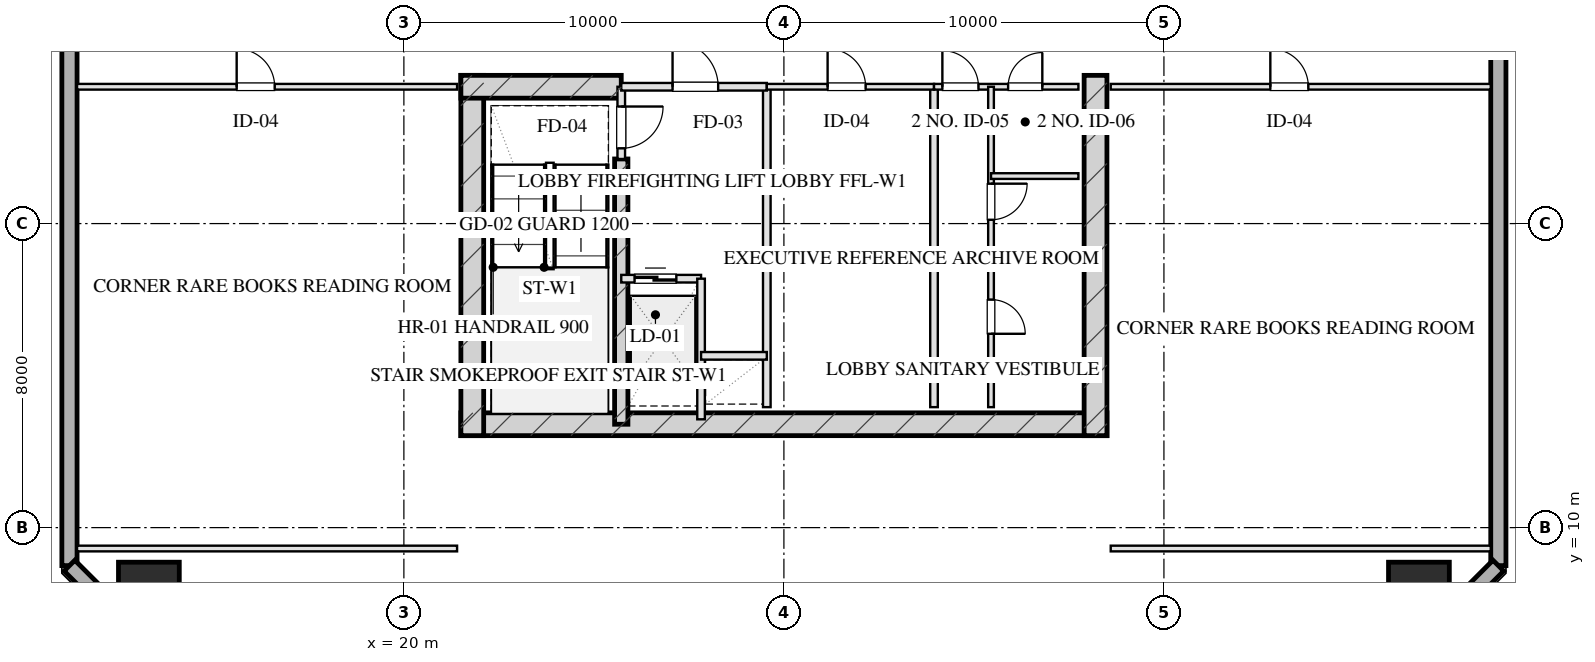
"""IFC4 building model, lengths in metres.
Left out: names, types, materials, properties, quantities, classifications, styles, units other than length and angle.
Written with IfcOpenShell. Run it as: python <this file> out.ifc"""

import sys

from ifc_helpers import new_model, si_unit, direction, frame, frame_2d, origin, origin_2d, place, context, subcontext, project, spatial, rectangle, hollow_rectangle, extrude, element, fill, save


model = new_model("IFC4")
c1 = context("Model", 3, precision=1e-05, world=origin(), true_north=direction((0.0, 1.0)))
c2 = subcontext(c1, "Body", "Model", "MODEL_VIEW")
j1 = project(units=[si_unit("LENGTHUNIT", "METRE"), si_unit("PLANEANGLEUNIT", "RADIAN")], contexts=[c1])
p1 = place(None, origin())
s1 = spatial("IfcSite", under=j1, at=p1, CompositionType="ELEMENT")
p2 = place(p1, origin())
s2 = spatial("IfcBuilding", under=s1, at=p2, CompositionType="ELEMENT")
p3 = place(p2, frame((0.0, 0.0, 100.05)))
s3 = spatial("IfcBuildingStorey", under=s2, at=p3, CompositionType="ELEMENT", Elevation=100.05)
p4 = place(p3, frame((21.5, 12.72, 0.0), z_axis=(0.0, 0.0, 1.0), x_axis=(1.0, 0.0, 0.0)))
e1 = element("IfcWall", 1, at=p4, inside=s3, PredefinedType="SHEAR", context=c2, shape_type="SweptSolid", body=[
    extrude(rectangle(XDim=17.0, YDim=0.6, at=frame_2d((8.5, 0.0))), origin(), (0.0, 0.0, 1.0), 3.45),
])
for number, where, z_axis, x_axis in (
    (2, (21.8, 21.9, 0.0), (0.0, 0.0, 1.0), (0.0, -1.0, 0.0)),
    (3, (38.2, 21.9, 0.0), (0.0, 0.0, 1.0), (0.0, -1.0, 0.0)),
):
    element("IfcWall", number, at=place(p3, frame(where, z_axis=z_axis, x_axis=x_axis)), inside=s3, PredefinedType="SHEAR", context=c2, shape_type="SweptSolid", body=[
        extrude(rectangle(XDim=9.48, YDim=0.6, at=frame_2d((4.74, 0.0))), origin(), (0.0, 0.0, 1.0), 3.45),
    ])
p5 = place(p3, frame((25.72, 19.7, 0.0), z_axis=(0.0, 0.0, 1.0), x_axis=(0.0, -1.0, 0.0)))
e4 = element("IfcWall", 4, at=p5, inside=s3, PredefinedType="SHEAR", context=c2, shape_type="SweptSolid", body=[
    extrude(rectangle(XDim=6.98, YDim=0.35, at=frame_2d((3.49, 0.0))), origin(), (0.0, 0.0, 1.0), 3.45),
])
p6 = place(p3, frame((21.5, 21.6, 0.0), z_axis=(0.0, 0.0, 1.0), x_axis=(1.0, 0.0, 0.0)))
e5 = element("IfcWall", 5, at=p6, inside=s3, PredefinedType="SHEAR", context=c2, shape_type="SweptSolid", body=[
    extrude(rectangle(XDim=4.22, YDim=0.6, at=frame_2d((2.11, 0.0))), origin(), (0.0, 0.0, 1.0), 3.45),
])
for number, where, z_axis, x_axis in (
    (6, (13.29, 8.29, 0.0), (0.0, 0.0, 1.0), (1.0, 0.0, 0.0)),
    (7, (46.71, 8.29, 0.0), (0.0, 0.0, 1.0), (1.0, 0.0, 0.0)),
):
    element("IfcColumn", number, at=place(p3, frame(where, z_axis=z_axis, x_axis=x_axis)), inside=s3, PredefinedType="COLUMN", context=c2, shape_type="SweptSolid", body=[
        extrude(hollow_rectangle(XDim=1.6, YDim=1.6, WallThickness=0.055, at=origin_2d()), origin(), (0.0, 0.0, 1.0), 3.451),
    ])
p7 = place(p3, frame((11.2, 9.0, 0.0), z_axis=(0.0, 0.0, 1.0), x_axis=(0.0, 1.0, 0.0)))
e8 = element("IfcWall", 8, at=p7, inside=s3, PredefinedType="SOLIDWALL", context=c2, shape_type="SweptSolid", body=[
    extrude(rectangle(XDim=50.0, YDim=0.4, at=frame_2d((25.0, 0.0))), origin(), (0.0, 0.0, 1.0), 2.55),
])
p8 = place(p7, frame((21.2, 0.0, 0.75)))
e9 = element("IfcOpeningElement", 9, at=p8, cuts=e8, PredefinedType="OPENING", context=c2, shape_type="SweptSolid", body=[
    extrude(rectangle(XDim=2.4, YDim=1.4, at=frame_2d((1.2, 0.7))), frame((0.0, 0.21, 0.0), z_axis=(0.0, -1.0, 0.0), x_axis=(1.0, 0.0, 0.0)), (0.0, 0.0, 1.0), 0.42),
])
p9 = place(p7, frame((27.55, 0.0, 0.0)))
e10 = element("IfcOpeningElement", 10, at=p9, cuts=e8, PredefinedType="OPENING", context=c2, shape_type="SweptSolid", body=[
    extrude(rectangle(XDim=1.1, YDim=2.15, at=frame_2d((0.55, 1.075))), frame((0.0, 0.21, 0.0), z_axis=(0.0, -1.0, 0.0), x_axis=(1.0, 0.0, 0.0)), (0.0, 0.0, 1.0), 0.42),
])
p10 = place(p3, frame((48.8, 59.0, 0.0), z_axis=(0.0, 0.0, 1.0), x_axis=(0.0, -1.0, 0.0)))
e11 = element("IfcWall", 11, at=p10, inside=s3, PredefinedType="SOLIDWALL", context=c2, shape_type="SweptSolid", body=[
    extrude(rectangle(XDim=50.0, YDim=0.4, at=frame_2d((25.0, 0.0))), origin(), (0.0, 0.0, 1.0), 2.55),
])
p11 = place(p10, frame((18.65, 0.0, 0.0)))
e12 = element("IfcOpeningElement", 12, at=p11, cuts=e11, PredefinedType="OPENING", context=c2, shape_type="SweptSolid", body=[
    extrude(rectangle(XDim=1.1, YDim=2.15, at=frame_2d((0.55, 1.075))), frame((0.0, 0.21, 0.0), z_axis=(0.0, -1.0, 0.0), x_axis=(1.0, 0.0, 0.0)), (0.0, 0.0, 1.0), 0.42),
])
for number, where, z_axis, x_axis in (
    (13, (48.8, 9.0, 0.0), (0.0, 0.0, 1.0), (-0.707, -0.707, 0.0)),
    (14, (14.0, 6.2, 0.0), (0.0, 0.0, 1.0), (-0.707, 0.707, 0.0)),
):
    element("IfcWall", number, at=place(p3, frame(where, z_axis=z_axis, x_axis=x_axis)), inside=s3, PredefinedType="SOLIDWALL", context=c2, shape_type="SweptSolid", body=[
        extrude(rectangle(XDim=3.96, YDim=0.4, at=frame_2d((1.98, 0.0))), origin(), (0.0, 0.0, 1.0), 2.55),
    ])
p12 = place(p3, frame((25.72, 21.6, 0.0), z_axis=(0.0, 0.0, 1.0), x_axis=(0.0, -1.0, 0.0)))
e15 = element("IfcWall", 15, at=p12, inside=s3, PredefinedType="PARTITIONING", context=c2, shape_type="SweptSolid", body=[
    extrude(rectangle(XDim=1.9, YDim=0.2, at=frame_2d((0.95, 0.0))), origin(), (0.0, 0.0, 1.0), 3.155),
])
p13 = place(p12, frame((0.52, 0.0, 0.0)))
e16 = element("IfcOpeningElement", 16, at=p13, cuts=e15, PredefinedType="OPENING", context=c2, shape_type="SweptSolid", body=[
    extrude(rectangle(XDim=1.1, YDim=2.05, at=frame_2d((0.55, 1.025))), frame((0.0, 0.11, 0.0), z_axis=(0.0, -1.0, 0.0), x_axis=(1.0, 0.0, 0.0)), (0.0, 0.0, 1.0), 0.22),
])
p14 = place(p3, frame((29.55, 21.6, 0.0), z_axis=(0.0, 0.0, 1.0), x_axis=(0.0, -1.0, 0.0)))
e17 = element("IfcWall", 17, at=p14, inside=s3, PredefinedType="PARTITIONING", context=c2, shape_type="SweptSolid", body=[
    extrude(rectangle(XDim=8.43, YDim=0.2, at=frame_2d((4.215, 0.0))), origin(), (0.0, 0.0, 1.0), 3.155),
])
p15 = place(p3, frame((25.72, 21.6, 0.0), z_axis=(0.0, 0.0, 1.0), x_axis=(1.0, 0.0, 0.0)))
e18 = element("IfcWall", 18, at=p15, inside=s3, PredefinedType="PARTITIONING", context=c2, shape_type="SweptSolid", body=[
    extrude(rectangle(XDim=3.83, YDim=0.2, at=frame_2d((1.915, 0.0))), origin(), (0.0, 0.0, 1.0), 3.155),
])
p16 = place(p15, frame((1.35, 0.0, 0.0)))
e19 = element("IfcOpeningElement", 19, at=p16, cuts=e18, PredefinedType="OPENING", context=c2, shape_type="SweptSolid", body=[
    extrude(rectangle(XDim=1.2, YDim=2.05, at=frame_2d((0.6, 1.025))), frame((0.0, 0.11, 0.0), z_axis=(0.0, -1.0, 0.0), x_axis=(1.0, 0.0, 0.0)), (0.0, 0.0, 1.0), 0.22),
])
p17 = place(p3, frame((25.72, 16.55, 0.0), z_axis=(0.0, 0.0, 1.0), x_axis=(1.0, 0.0, 0.0)))
e20 = element("IfcWall", 20, at=p17, inside=s3, PredefinedType="PARTITIONING", context=c2, shape_type="SweptSolid", body=[
    extrude(rectangle(XDim=2.1, YDim=0.2, at=frame_2d((1.05, 0.0))), origin(), (0.0, 0.0, 1.0), 3.155),
])
p18 = place(p17, frame((0.35, 0.0, 0.0)))
e21 = element("IfcOpeningElement", 21, at=p18, cuts=e20, PredefinedType="OPENING", context=c2, shape_type="SweptSolid", body=[
    extrude(rectangle(XDim=1.1, YDim=2.05, at=frame_2d((0.55, 1.025))), frame((0.0, 0.11, 0.0), z_axis=(0.0, -1.0, 0.0), x_axis=(1.0, 0.0, 0.0)), (0.0, 0.0, 1.0), 0.22),
])
p19 = place(p3, frame((27.82, 16.55, 0.0), z_axis=(0.0, 0.0, 1.0), x_axis=(0.0, -1.0, 0.0)))
e22 = element("IfcWall", 22, at=p19, inside=s3, PredefinedType="PARTITIONING", context=c2, shape_type="SweptSolid", body=[
    extrude(rectangle(XDim=3.7, YDim=0.2, at=frame_2d((1.85, 0.0))), origin(), (0.0, 0.0, 1.0), 3.155),
])
p20 = place(p3, frame((27.82, 14.52, 0.0), z_axis=(0.0, 0.0, 1.0), x_axis=(1.0, 0.0, 0.0)))
e23 = element("IfcWall", 23, at=p20, inside=s3, PredefinedType="PARTITIONING", context=c2, shape_type="SweptSolid", body=[
    extrude(rectangle(XDim=1.73, YDim=0.2, at=frame_2d((0.865, 0.0))), origin(), (0.0, 0.0, 1.0), 3.155),
])
p21 = place(p3, frame((33.95, 21.6, 0.0), z_axis=(0.0, 0.0, 1.0), x_axis=(0.0, -1.0, 0.0)))
e24 = element("IfcWall", 24, at=p21, inside=s3, PredefinedType="PARTITIONING", context=c2, shape_type="SweptSolid", body=[
    extrude(rectangle(XDim=8.43, YDim=0.2, at=frame_2d((4.215, 0.0))), origin(), (0.0, 0.0, 1.0), 3.155),
])
p22 = place(p3, frame((29.55, 21.6, 0.0), z_axis=(0.0, 0.0, 1.0), x_axis=(1.0, 0.0, 0.0)))
e25 = element("IfcWall", 25, at=p22, inside=s3, PredefinedType="PARTITIONING", context=c2, shape_type="SweptSolid", body=[
    extrude(rectangle(XDim=4.4, YDim=0.15, at=frame_2d((2.2, 0.0))), origin(), (0.0, 0.0, 1.0), 3.155),
])
p23 = place(p22, frame((1.6, 0.0, 0.0)))
e26 = element("IfcOpeningElement", 26, at=p23, cuts=e25, PredefinedType="OPENING", context=c2, shape_type="SweptSolid", body=[
    extrude(rectangle(XDim=1.0, YDim=2.05, at=frame_2d((0.5, 1.025))), frame((0.0, 0.085, 0.0), z_axis=(0.0, -1.0, 0.0), x_axis=(1.0, 0.0, 0.0)), (0.0, 0.0, 1.0), 0.17),
])
p24 = place(p3, frame((33.95, 21.6, 0.0), z_axis=(0.0, 0.0, 1.0), x_axis=(1.0, 0.0, 0.0)))
e27 = element("IfcWall", 27, at=p24, inside=s3, PredefinedType="PARTITIONING", context=c2, shape_type="SweptSolid", body=[
    extrude(rectangle(XDim=3.8, YDim=0.15, at=frame_2d((1.9, 0.0))), origin(), (0.0, 0.0, 1.0), 3.155),
])
p25 = place(p24, frame((0.22, 0.0, 0.0)))
e28 = element("IfcOpeningElement", 28, at=p25, cuts=e27, PredefinedType="OPENING", context=c2, shape_type="SweptSolid", body=[
    extrude(rectangle(XDim=0.95, YDim=2.05, at=frame_2d((0.475, 1.025))), frame((0.0, 0.085, 0.0), z_axis=(0.0, -1.0, 0.0), x_axis=(1.0, 0.0, 0.0)), (0.0, 0.0, 1.0), 0.17),
])
p26 = place(p24, frame((1.95, 0.0, 0.0)))
e29 = element("IfcOpeningElement", 29, at=p26, cuts=e27, PredefinedType="OPENING", context=c2, shape_type="SweptSolid", body=[
    extrude(rectangle(XDim=0.9, YDim=2.05, at=frame_2d((0.45, 1.025))), frame((0.0, 0.085, 0.0), z_axis=(0.0, -1.0, 0.0), x_axis=(1.0, 0.0, 0.0)), (0.0, 0.0, 1.0), 0.17),
])
p27 = place(p3, frame((35.45, 21.6, 0.0), z_axis=(0.0, 0.0, 1.0), x_axis=(0.0, -1.0, 0.0)))
e30 = element("IfcWall", 30, at=p27, inside=s3, PredefinedType="PARTITIONING", context=c2, shape_type="SweptSolid", body=[
    extrude(rectangle(XDim=8.43, YDim=0.15, at=frame_2d((4.215, 0.0))), origin(), (0.0, 0.0, 1.0), 2.815),
])
p28 = place(p27, frame((2.55, 0.0, 0.0)))
e31 = element("IfcOpeningElement", 31, at=p28, cuts=e30, PredefinedType="OPENING", context=c2, shape_type="SweptSolid", body=[
    extrude(rectangle(XDim=0.95, YDim=2.05, at=frame_2d((0.475, 1.025))), frame((0.0, 0.085, 0.0), z_axis=(0.0, -1.0, 0.0), x_axis=(1.0, 0.0, 0.0)), (0.0, 0.0, 1.0), 0.17),
])
p29 = place(p27, frame((5.6, 0.0, 0.0)))
e32 = element("IfcOpeningElement", 32, at=p29, cuts=e30, PredefinedType="OPENING", context=c2, shape_type="SweptSolid", body=[
    extrude(rectangle(XDim=0.9, YDim=2.05, at=frame_2d((0.45, 1.025))), frame((0.0, 0.085, 0.0), z_axis=(0.0, -1.0, 0.0), x_axis=(1.0, 0.0, 0.0)), (0.0, 0.0, 1.0), 0.17),
])
for number, where, z_axis, x_axis in (
    (33, (35.45, 17.2, 0.0), (0.0, 0.0, 1.0), (1.0, 0.0, 0.0)),
    (34, (35.45, 19.25, 0.0), (0.0, 0.0, 1.0), (1.0, 0.0, 0.0)),
):
    element("IfcWall", number, at=place(p3, frame(where, z_axis=z_axis, x_axis=x_axis)), inside=s3, PredefinedType="PARTITIONING", context=c2, shape_type="SweptSolid", body=[
        extrude(rectangle(XDim=2.3, YDim=0.15, at=frame_2d((1.15, 0.0))), origin(), (0.0, 0.0, 1.0), 3.155),
    ])
p30 = place(p3, frame((11.4, 9.45, 0.0), z_axis=(0.0, 0.0, 1.0), x_axis=(1.0, 0.0, 0.0)))
e35 = element("IfcWall", 35, at=p30, inside=s3, PredefinedType="PARTITIONING", context=c2, shape_type="SweptSolid", body=[
    extrude(rectangle(XDim=10.0, YDim=0.15, at=frame_2d((5.0, 0.0))), origin(), (0.0, 0.0, 1.0), 3.155),
])
p31 = place(p3, frame((11.4, 21.6, 0.0), z_axis=(0.0, 0.0, 1.0), x_axis=(1.0, 0.0, 0.0)))
e36 = element("IfcWall", 36, at=p31, inside=s3, PredefinedType="PARTITIONING", context=c2, shape_type="SweptSolid", body=[
    extrude(rectangle(XDim=10.0, YDim=0.15, at=frame_2d((5.0, 0.0))), origin(), (0.0, 0.0, 1.0), 3.155),
])
p32 = place(p31, frame((4.2, 0.0, 0.0)))
e37 = element("IfcOpeningElement", 37, at=p32, cuts=e36, PredefinedType="OPENING", context=c2, shape_type="SweptSolid", body=[
    extrude(rectangle(XDim=1.0, YDim=2.05, at=frame_2d((0.5, 1.025))), frame((0.0, 0.085, 0.0), z_axis=(0.0, -1.0, 0.0), x_axis=(1.0, 0.0, 0.0)), (0.0, 0.0, 1.0), 0.17),
])
p33 = place(p3, frame((38.6, 9.45, 0.0), z_axis=(0.0, 0.0, 1.0), x_axis=(1.0, 0.0, 0.0)))
e38 = element("IfcWall", 38, at=p33, inside=s3, PredefinedType="PARTITIONING", context=c2, shape_type="SweptSolid", body=[
    extrude(rectangle(XDim=10.0, YDim=0.15, at=frame_2d((5.0, 0.0))), origin(), (0.0, 0.0, 1.0), 3.155),
])
p34 = place(p3, frame((38.6, 21.6, 0.0), z_axis=(0.0, 0.0, 1.0), x_axis=(1.0, 0.0, 0.0)))
e39 = element("IfcWall", 39, at=p34, inside=s3, PredefinedType="PARTITIONING", context=c2, shape_type="SweptSolid", body=[
    extrude(rectangle(XDim=10.0, YDim=0.15, at=frame_2d((5.0, 0.0))), origin(), (0.0, 0.0, 1.0), 3.155),
])
p35 = place(p34, frame((4.2, 0.0, 0.0)))
e40 = element("IfcOpeningElement", 40, at=p35, cuts=e39, PredefinedType="OPENING", context=c2, shape_type="SweptSolid", body=[
    extrude(rectangle(XDim=1.0, YDim=2.05, at=frame_2d((0.5, 1.025))), frame((0.0, 0.085, 0.0), z_axis=(0.0, -1.0, 0.0), x_axis=(1.0, 0.0, 0.0)), (0.0, 0.0, 1.0), 0.17),
])
p36 = place(p13, origin())
e41 = element("IfcDoor", 41, at=p36, inside=s3, OperationType="SINGLE_SWING_LEFT", PredefinedType="DOOR", context=c2, shape_type="SweptSolid", body=[
    extrude(rectangle(XDim=1.1, YDim=2.05, at=frame_2d((0.55, 1.025))), frame((0.0, 0.025, 0.0), z_axis=(0.0, -1.0, 0.0), x_axis=(1.0, 0.0, 0.0)), (0.0, 0.0, 1.0), 0.05),
])
fill(e16, e41)
p37 = place(p16, origin())
e42 = element("IfcDoor", 42, at=p37, inside=s3, OperationType="SINGLE_SWING_LEFT", PredefinedType="DOOR", context=c2, shape_type="SweptSolid", body=[
    extrude(rectangle(XDim=1.2, YDim=2.05, at=frame_2d((0.6, 1.025))), frame((0.0, 0.025, 0.0), z_axis=(0.0, -1.0, 0.0), x_axis=(1.0, 0.0, 0.0)), (0.0, 0.0, 1.0), 0.05),
])
fill(e19, e42)
p38 = place(p18, origin())
e43 = element("IfcDoor", 43, at=p38, inside=s3, OperationType="DOUBLE_DOOR_SLIDING", PredefinedType="DOOR", context=c2, shape_type="SweptSolid", body=[
    extrude(rectangle(XDim=1.1, YDim=2.05, at=frame_2d((0.55, 1.025))), frame((0.0, 0.025, 0.0), z_axis=(0.0, -1.0, 0.0), x_axis=(1.0, 0.0, 0.0)), (0.0, 0.0, 1.0), 0.05),
])
fill(e21, e43)
p39 = place(p23, origin())
e44 = element("IfcDoor", 44, at=p39, inside=s3, OperationType="SINGLE_SWING_LEFT", PredefinedType="DOOR", context=c2, shape_type="SweptSolid", body=[
    extrude(rectangle(XDim=1.0, YDim=2.05, at=frame_2d((0.5, 1.025))), frame((0.0, 0.025, 0.0), z_axis=(0.0, -1.0, 0.0), x_axis=(1.0, 0.0, 0.0)), (0.0, 0.0, 1.0), 0.05),
])
fill(e26, e44)
p40 = place(p25, origin())
e45 = element("IfcDoor", 45, at=p40, inside=s3, OperationType="SINGLE_SWING_LEFT", PredefinedType="DOOR", context=c2, shape_type="SweptSolid", body=[
    extrude(rectangle(XDim=0.95, YDim=2.05, at=frame_2d((0.475, 1.025))), frame((0.0, 0.025, 0.0), z_axis=(0.0, -1.0, 0.0), x_axis=(1.0, 0.0, 0.0)), (0.0, 0.0, 1.0), 0.05),
])
fill(e28, e45)
p41 = place(p26, origin())
e46 = element("IfcDoor", 46, at=p41, inside=s3, OperationType="SINGLE_SWING_RIGHT", PredefinedType="DOOR", context=c2, shape_type="SweptSolid", body=[
    extrude(rectangle(XDim=0.9, YDim=2.05, at=frame_2d((0.45, 1.025))), frame((0.0, 0.025, 0.0), z_axis=(0.0, -1.0, 0.0), x_axis=(1.0, 0.0, 0.0)), (0.0, 0.0, 1.0), 0.05),
])
fill(e29, e46)
p42 = place(p28, origin())
e47 = element("IfcDoor", 47, at=p42, inside=s3, OperationType="SINGLE_SWING_LEFT", PredefinedType="DOOR", context=c2, shape_type="SweptSolid", body=[
    extrude(rectangle(XDim=0.95, YDim=2.05, at=frame_2d((0.475, 1.025))), frame((0.0, 0.025, 0.0), z_axis=(0.0, -1.0, 0.0), x_axis=(1.0, 0.0, 0.0)), (0.0, 0.0, 1.0), 0.05),
])
fill(e31, e47)
p43 = place(p29, origin())
e48 = element("IfcDoor", 48, at=p43, inside=s3, OperationType="SINGLE_SWING_RIGHT", PredefinedType="DOOR", context=c2, shape_type="SweptSolid", body=[
    extrude(rectangle(XDim=0.9, YDim=2.05, at=frame_2d((0.45, 1.025))), frame((0.0, 0.025, 0.0), z_axis=(0.0, -1.0, 0.0), x_axis=(1.0, 0.0, 0.0)), (0.0, 0.0, 1.0), 0.05),
])
fill(e32, e48)
p44 = place(p32, origin())
e49 = element("IfcDoor", 49, at=p44, inside=s3, OperationType="SINGLE_SWING_LEFT", PredefinedType="DOOR", context=c2, shape_type="SweptSolid", body=[
    extrude(rectangle(XDim=1.0, YDim=2.05, at=frame_2d((0.5, 1.025))), frame((0.0, 0.025, 0.0), z_axis=(0.0, -1.0, 0.0), x_axis=(1.0, 0.0, 0.0)), (0.0, 0.0, 1.0), 0.05),
])
fill(e37, e49)
p45 = place(p35, origin())
e50 = element("IfcDoor", 50, at=p45, inside=s3, OperationType="SINGLE_SWING_LEFT", PredefinedType="DOOR", context=c2, shape_type="SweptSolid", body=[
    extrude(rectangle(XDim=1.0, YDim=2.05, at=frame_2d((0.5, 1.025))), frame((0.0, 0.025, 0.0), z_axis=(0.0, -1.0, 0.0), x_axis=(1.0, 0.0, 0.0)), (0.0, 0.0, 1.0), 0.05),
])
fill(e40, e50)
save(model, sys.argv[1])
